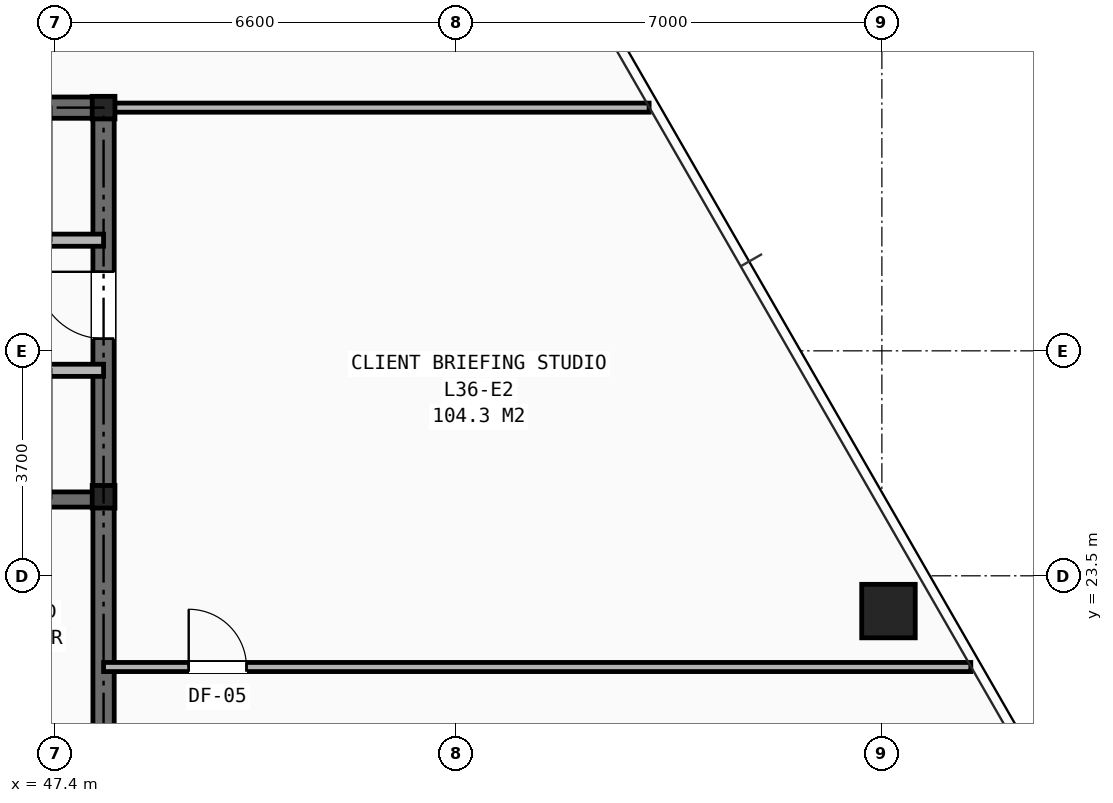
"""IFC4 building model, lengths in metres.
Left out: names, types, materials, properties, quantities, classifications, styles, units other than length and angle.
Written with IfcOpenShell. Run it as: python <this file> out.ifc"""

import sys

from ifc_helpers import new_model, si_unit, direction, frame, frame_2d, origin, origin_2d, place, context, subcontext, project, spatial, rectangle, hollow_rectangle, i_section, extrude, element, fill, save


model = new_model("IFC4")
c1 = context("Model", 3, precision=1e-05, world=origin(), true_north=direction((0.0, 1.0)))
c2 = subcontext(c1, "Body", "Model", "MODEL_VIEW")
j1 = project(units=[si_unit("LENGTHUNIT", "METRE"), si_unit("PLANEANGLEUNIT", "RADIAN")], contexts=[c1])
p1 = place(None, origin())
s1 = spatial("IfcSite", under=j1, at=p1, CompositionType="ELEMENT")
p2 = place(p1, origin())
s2 = spatial("IfcBuilding", under=s1, at=p2, CompositionType="ELEMENT")
p3 = place(p2, frame((0.0, 0.0, 126.35)))
s3 = spatial("IfcBuildingStorey", under=s2, at=p3, CompositionType="ELEMENT", Elevation=126.35)
for number, where, z_axis, x_axis in (
    (1, (48.2, 24.8, 0.0), (0.0, 0.0, 1.0), (1.0, 0.0, 0.0)),
    (2, (48.2, 31.2, 0.0), (0.0, 0.0, 1.0), (1.0, 0.0, 0.0)),
):
    element("IfcColumn", number, at=place(p3, frame(where, z_axis=z_axis, x_axis=x_axis)), inside=s3, PredefinedType="COLUMN", context=c2, shape_type="SweptSolid", body=[
        extrude(i_section(OverallWidth=0.374, OverallDepth=0.372, WebThickness=0.016, FlangeThickness=0.026, at=origin_2d()), origin(), (0.0, 0.0, 1.0), 3.45),
    ])
p4 = place(p3, frame((61.108, 22.92, 0.0), z_axis=(0.0, 0.0, 1.0), x_axis=(1.0, 0.0, 0.0)))
e3 = element("IfcColumn", 3, at=p4, inside=s3, PredefinedType="COLUMN", context=c2, shape_type="SweptSolid", body=[
    extrude(hollow_rectangle(XDim=0.88, YDim=0.88, WallThickness=0.06, at=origin_2d()), origin(), (0.0, 0.0, 1.0), 3.45),
])
p5 = place(p3, frame((31.8, 31.2, 0.0), z_axis=(0.0, 0.0, 1.0), x_axis=(1.0, 0.0, 0.0)))
e4 = element("IfcWall", 4, at=p5, inside=s3, PredefinedType="SHEAR", context=c2, shape_type="SweptSolid", body=[
    extrude(rectangle(XDim=16.4, YDim=0.35, at=frame_2d((8.2, 0.0))), origin(), (0.0, 0.0, 1.0), 3.21),
])
p6 = place(p3, frame((48.2, 16.4, 0.0), z_axis=(0.0, 0.0, 1.0), x_axis=(0.0, 1.0, 0.0)))
e5 = element("IfcWall", 5, at=p6, inside=s3, PredefinedType="SHEAR", context=c2, shape_type="SweptSolid", body=[
    extrude(rectangle(XDim=14.8, YDim=0.35, at=frame_2d((7.4, 0.0))), origin(), (0.0, 0.0, 1.0), 3.21),
])
p7 = place(p6, frame((11.0, 0.0, 0.0)))
e6 = element("IfcOpeningElement", 6, at=p7, cuts=e5, PredefinedType="OPENING", context=c2, shape_type="SweptSolid", body=[
    extrude(rectangle(XDim=1.1, YDim=2.15, at=frame_2d((0.55, 1.075))), frame((0.0, 0.185, 0.0), z_axis=(0.0, -1.0, 0.0), x_axis=(1.0, 0.0, 0.0)), (0.0, 0.0, 1.0), 0.37),
])
p8 = place(p3, frame((44.955, 24.755, 0.0), z_axis=(0.0, 0.0, 1.0), x_axis=(1.0, 0.0, 0.0)))
e7 = element("IfcWall", 7, at=p8, inside=s3, PredefinedType="SHEAR", context=c2, shape_type="SweptSolid", body=[
    extrude(rectangle(XDim=3.245, YDim=0.25, at=frame_2d((1.623, 0.0))), origin(), (0.0, 0.0, 1.0), 3.21),
])
p9 = place(p3, frame((33.82, 29.02, 0.0), z_axis=(0.0, 0.0, 1.0), x_axis=(1.0, 0.0, 0.0)))
e8 = element("IfcWall", 8, at=p9, inside=s3, PredefinedType="SOLIDWALL", context=c2, shape_type="SweptSolid", body=[
    extrude(rectangle(XDim=14.38, YDim=0.2, at=frame_2d((7.19, 0.0))), origin(), (0.0, 0.0, 1.0), 2.661),
])
p10 = place(p9, frame((3.92, 0.0, 0.0)))
e9 = element("IfcOpeningElement", 9, at=p10, cuts=e8, PredefinedType="OPENING", context=c2, shape_type="SweptSolid", body=[
    extrude(rectangle(XDim=0.9, YDim=2.1, at=frame_2d((0.45, 1.05))), frame((0.0, 0.11, 0.0), z_axis=(0.0, -1.0, 0.0), x_axis=(1.0, 0.0, 0.0)), (0.0, 0.0, 1.0), 0.22),
])
p11 = place(p3, frame((33.82, 26.88, 0.0), z_axis=(0.0, 0.0, 1.0), x_axis=(1.0, 0.0, 0.0)))
e10 = element("IfcWall", 10, at=p11, inside=s3, PredefinedType="SOLIDWALL", context=c2, shape_type="SweptSolid", body=[
    extrude(rectangle(XDim=14.38, YDim=0.2, at=frame_2d((7.19, 0.0))), origin(), (0.0, 0.0, 1.0), 2.661),
])
p12 = place(p11, frame((0.53, 0.0, 0.0)))
e11 = element("IfcOpeningElement", 11, at=p12, cuts=e10, PredefinedType="OPENING", context=c2, shape_type="SweptSolid", body=[
    extrude(rectangle(XDim=1.1, YDim=2.15, at=frame_2d((0.55, 1.075))), frame((0.0, 0.11, 0.0), z_axis=(0.0, -1.0, 0.0), x_axis=(1.0, 0.0, 0.0)), (0.0, 0.0, 1.0), 0.22),
])
p13 = place(p11, frame((2.69, 0.0, 0.0)))
e12 = element("IfcOpeningElement", 12, at=p13, cuts=e10, PredefinedType="OPENING", context=c2, shape_type="SweptSolid", body=[
    extrude(rectangle(XDim=1.1, YDim=2.15, at=frame_2d((0.55, 1.075))), frame((0.0, 0.11, 0.0), z_axis=(0.0, -1.0, 0.0), x_axis=(1.0, 0.0, 0.0)), (0.0, 0.0, 1.0), 0.22),
])
p14 = place(p11, frame((4.85, 0.0, 0.0)))
e13 = element("IfcOpeningElement", 13, at=p14, cuts=e10, PredefinedType="OPENING", context=c2, shape_type="SweptSolid", body=[
    extrude(rectangle(XDim=1.1, YDim=2.15, at=frame_2d((0.55, 1.075))), frame((0.0, 0.11, 0.0), z_axis=(0.0, -1.0, 0.0), x_axis=(1.0, 0.0, 0.0)), (0.0, 0.0, 1.0), 0.22),
])
p15 = place(p11, frame((7.01, 0.0, 0.0)))
e14 = element("IfcOpeningElement", 14, at=p15, cuts=e10, PredefinedType="OPENING", context=c2, shape_type="SweptSolid", body=[
    extrude(rectangle(XDim=1.1, YDim=2.15, at=frame_2d((0.55, 1.075))), frame((0.0, 0.11, 0.0), z_axis=(0.0, -1.0, 0.0), x_axis=(1.0, 0.0, 0.0)), (0.0, 0.0, 1.0), 0.22),
])
p16 = place(p3, frame((48.2, 31.2, 0.0), z_axis=(0.0, 0.0, 1.0), x_axis=(1.0, 0.0, 0.0)))
e15 = element("IfcWall", 15, at=p16, inside=s3, PredefinedType="PARTITIONING", context=c2, shape_type="SweptSolid", body=[
    extrude(rectangle(XDim=8.972, YDim=0.15, at=frame_2d((4.486, 0.0))), origin(), (0.0, 0.0, 1.0), 2.225),
])
p17 = place(p3, frame((48.2, 22.0, 0.0), z_axis=(0.0, 0.0, 1.0), x_axis=(1.0, 0.0, 0.0)))
e16 = element("IfcWall", 16, at=p17, inside=s3, PredefinedType="PARTITIONING", context=c2, shape_type="SweptSolid", body=[
    extrude(rectangle(XDim=14.262, YDim=0.15, at=frame_2d((7.131, 0.0))), origin(), (0.0, 0.0, 1.0), 2.589),
])
p18 = place(p17, frame((1.4, 0.0, 0.0)))
e17 = element("IfcOpeningElement", 17, at=p18, cuts=e16, PredefinedType="OPENING", context=c2, shape_type="SweptSolid", body=[
    extrude(rectangle(XDim=0.95, YDim=2.1, at=frame_2d((0.475, 1.05))), frame((0.0, 0.085, 0.0), z_axis=(0.0, -1.0, 0.0), x_axis=(1.0, 0.0, 0.0)), (0.0, 0.0, 1.0), 0.17),
])
p19 = place(p7, origin())
e18 = element("IfcDoor", 18, at=p19, inside=s3, OperationType="SINGLE_SWING_RIGHT", PredefinedType="DOOR", context=c2, shape_type="SweptSolid", body=[
    extrude(rectangle(XDim=1.1, YDim=2.15, at=frame_2d((0.55, 1.075))), frame((0.0, 0.025, 0.0), z_axis=(0.0, -1.0, 0.0), x_axis=(1.0, 0.0, 0.0)), (0.0, 0.0, 1.0), 0.05),
])
fill(e6, e18)
p20 = place(p18, origin())
e19 = element("IfcDoor", 19, at=p20, inside=s3, OperationType="SINGLE_SWING_LEFT", PredefinedType="DOOR", context=c2, shape_type="SweptSolid", body=[
    extrude(rectangle(XDim=0.95, YDim=2.1, at=frame_2d((0.475, 1.05))), frame((0.0, 0.025, 0.0), z_axis=(0.0, -1.0, 0.0), x_axis=(1.0, 0.0, 0.0)), (0.0, 0.0, 1.0), 0.05),
])
fill(e17, e19)
save(model, sys.argv[1])
